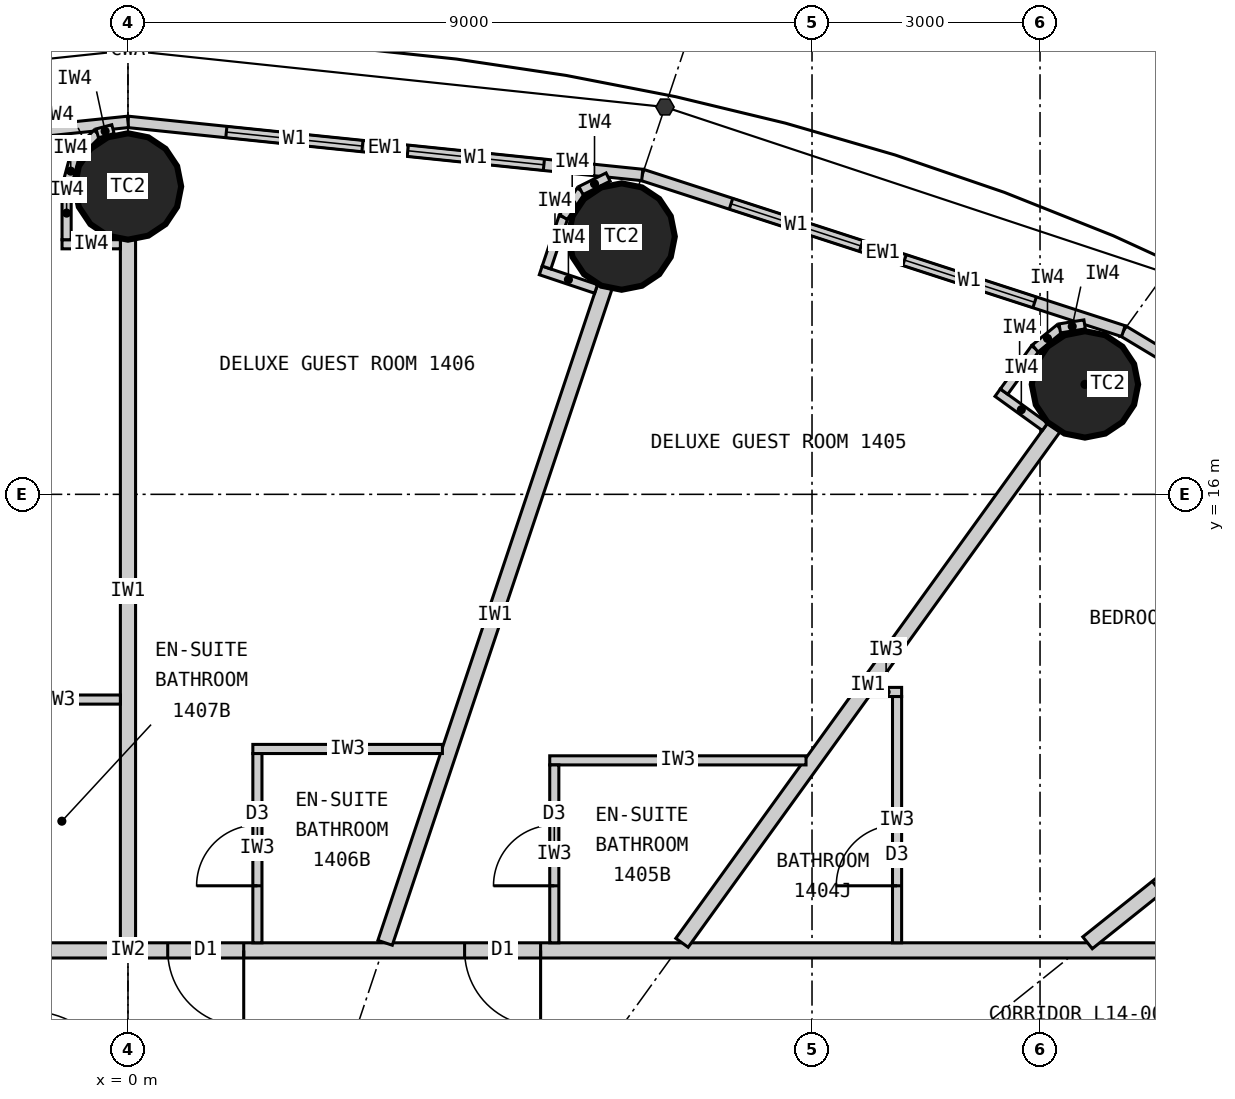
"""IFC4 building model, lengths in metres.
Left out: names, types, materials, properties, quantities, classifications, styles, units other than length and angle.
Written with IfcOpenShell. Run it as: python <this file> out.ifc"""

import sys

from ifc_helpers import new_model, si_unit, direction, frame, frame_2d, origin, origin_2d, place, context, subcontext, project, spatial, rectangle, circle, extrude, element, fill, save


model = new_model("IFC4")
c1 = context("Model", 3, precision=1e-05, world=origin(), true_north=direction((0.0, 1.0)))
c2 = subcontext(c1, "Body", "Model", "MODEL_VIEW")
j1 = project(units=[si_unit("LENGTHUNIT", "METRE"), si_unit("PLANEANGLEUNIT", "RADIAN")], contexts=[c1])
p1 = place(None, origin())
s1 = spatial("IfcSite", under=j1, at=p1, CompositionType="ELEMENT")
p2 = place(p1, origin())
s2 = spatial("IfcBuilding", under=s1, at=p2, CompositionType="ELEMENT")
p3 = place(p2, frame((0.0, 0.0, 60.6)))
s3 = spatial("IfcBuildingStorey", under=s2, at=p3, CompositionType="ELEMENT", Elevation=60.6)
for number, where, z_axis, x_axis in (
    (1, (12.591, 17.447, 0.0), (0.0, 0.0, 1.0), (1.0, 0.0, 0.0)),
    (2, (6.495, 19.391, 0.0), (0.0, 0.0, 1.0), (1.0, 0.0, 0.0)),
    (3, (0.0, 20.05, 0.0), (0.0, 0.0, 1.0), (1.0, 0.0, 0.0)),
):
    element("IfcColumn", number, at=place(p3, frame(where, z_axis=z_axis, x_axis=x_axis)), inside=s3, PredefinedType="COLUMN", context=c2, shape_type="SweptSolid", body=[
        extrude(circle(Radius=0.7, at=origin_2d()), origin(), (0.0, 0.0, 1.0), 3.3),
    ])
p4 = place(p3, frame((18.57, 14.856, 0.0), z_axis=(0.0, 0.0, 1.0), x_axis=(-0.856983180864, 0.515344377787, 0.0)))
e4 = element("IfcWall", 4, at=p4, inside=s3, PredefinedType="ELEMENTEDWALL", context=c2, shape_type="SweptSolid", body=[
    extrude(rectangle(XDim=6.386, YDim=0.15, at=frame_2d((3.193, 0.0))), origin(), (0.0, 0.0, 1.0), 3.12),
])
p5 = place(p4, frame((1.093, 0.0, 0.9)))
e5 = element("IfcOpeningElement", 5, at=p5, cuts=e4, PredefinedType="OPENING", context=c2, shape_type="SweptSolid", body=[
    extrude(rectangle(XDim=1.8, YDim=1.9, at=frame_2d((0.9, 0.95))), frame((0.0, 0.085, 0.0), z_axis=(0.0, -1.0, 0.0), x_axis=(1.0, 0.0, 0.0)), (0.0, 0.0, 1.0), 0.17),
])
p6 = place(p4, frame((3.493, 0.0, 0.9)))
e6 = element("IfcOpeningElement", 6, at=p6, cuts=e4, PredefinedType="OPENING", context=c2, shape_type="SweptSolid", body=[
    extrude(rectangle(XDim=1.8, YDim=1.9, at=frame_2d((0.9, 0.95))), frame((0.0, 0.085, 0.0), z_axis=(0.0, -1.0, 0.0), x_axis=(1.0, 0.0, 0.0)), (0.0, 0.0, 1.0), 0.17),
])
p7 = place(p3, frame((13.096, 18.147, 0.0), z_axis=(0.0, 0.0, 1.0), x_axis=(-0.951137534625, 0.308767534285, 0.0)))
e7 = element("IfcWall", 7, at=p7, inside=s3, PredefinedType="ELEMENTEDWALL", context=c2, shape_type="SweptSolid", body=[
    extrude(rectangle(XDim=6.655, YDim=0.15, at=frame_2d((3.328, 0.0))), origin(), (0.0, 0.0, 1.0), 3.12),
])
p8 = place(p7, frame((1.228, 0.0, 0.9)))
e8 = element("IfcOpeningElement", 8, at=p8, cuts=e7, PredefinedType="OPENING", context=c2, shape_type="SweptSolid", body=[
    extrude(rectangle(XDim=1.8, YDim=1.9, at=frame_2d((0.9, 0.95))), frame((0.0, 0.085, 0.0), z_axis=(0.0, -1.0, 0.0), x_axis=(1.0, 0.0, 0.0)), (0.0, 0.0, 1.0), 0.17),
])
p9 = place(p7, frame((3.628, 0.0, 0.9)))
e9 = element("IfcOpeningElement", 9, at=p9, cuts=e7, PredefinedType="OPENING", context=c2, shape_type="SweptSolid", body=[
    extrude(rectangle(XDim=1.8, YDim=1.9, at=frame_2d((0.9, 0.95))), frame((0.0, 0.085, 0.0), z_axis=(0.0, -1.0, 0.0), x_axis=(1.0, 0.0, 0.0)), (0.0, 0.0, 1.0), 0.17),
])
p10 = place(p3, frame((6.766, 20.202, 0.0), z_axis=(0.0, 0.0, 1.0), x_axis=(-0.994721394369, 0.102612609291, 0.0)))
e10 = element("IfcWall", 10, at=p10, inside=s3, PredefinedType="ELEMENTEDWALL", context=c2, shape_type="SweptSolid", body=[
    extrude(rectangle(XDim=6.802, YDim=0.15, at=frame_2d((3.401, 0.0))), origin(), (0.0, 0.0, 1.0), 3.12),
])
p11 = place(p10, frame((1.301, 0.0, 0.9)))
e11 = element("IfcOpeningElement", 11, at=p11, cuts=e10, PredefinedType="OPENING", context=c2, shape_type="SweptSolid", body=[
    extrude(rectangle(XDim=1.8, YDim=1.9, at=frame_2d((0.9, 0.95))), frame((0.0, 0.085, 0.0), z_axis=(0.0, -1.0, 0.0), x_axis=(1.0, 0.0, 0.0)), (0.0, 0.0, 1.0), 0.17),
])
p12 = place(p10, frame((3.701, 0.0, 0.9)))
e12 = element("IfcOpeningElement", 12, at=p12, cuts=e10, PredefinedType="OPENING", context=c2, shape_type="SweptSolid", body=[
    extrude(rectangle(XDim=1.8, YDim=1.9, at=frame_2d((0.9, 0.95))), frame((0.0, 0.085, 0.0), z_axis=(0.0, -1.0, 0.0), x_axis=(1.0, 0.0, 0.0)), (0.0, 0.0, 1.0), 0.17),
])
p13 = place(p3, frame((0.0, 20.9, 0.0), z_axis=(0.0, 0.0, 1.0), x_axis=(-0.994721394369, -0.102612609291, 0.0)))
e13 = element("IfcWall", 13, at=p13, inside=s3, PredefinedType="ELEMENTEDWALL", context=c2, shape_type="SweptSolid", body=[
    extrude(rectangle(XDim=6.802, YDim=0.15, at=frame_2d((3.401, 0.0))), origin(), (0.0, 0.0, 1.0), 3.12),
])
p14 = place(p13, frame((1.301, 0.0, 0.9)))
e14 = element("IfcOpeningElement", 14, at=p14, cuts=e13, PredefinedType="OPENING", context=c2, shape_type="SweptSolid", body=[
    extrude(rectangle(XDim=1.8, YDim=1.9, at=frame_2d((0.9, 0.95))), frame((0.0, 0.085, 0.0), z_axis=(0.0, -1.0, 0.0), x_axis=(1.0, 0.0, 0.0)), (0.0, 0.0, 1.0), 0.17),
])
p15 = place(p13, frame((3.701, 0.0, 0.9)))
e15 = element("IfcOpeningElement", 15, at=p15, cuts=e13, PredefinedType="OPENING", context=c2, shape_type="SweptSolid", body=[
    extrude(rectangle(XDim=1.8, YDim=1.9, at=frame_2d((0.9, 0.95))), frame((0.0, 0.085, 0.0), z_axis=(0.0, -1.0, 0.0), x_axis=(1.0, 0.0, 0.0)), (0.0, 0.0, 1.0), 0.17),
])
p16 = place(p3, frame((-14.1, 10.0, 0.0), z_axis=(0.0, 0.0, 1.0), x_axis=(1.0, 0.0, 0.0)))
e16 = element("IfcWall", 16, at=p16, inside=s3, PredefinedType="PARTITIONING", context=c2, shape_type="SweptSolid", body=[
    extrude(rectangle(XDim=28.2, YDim=0.2, at=frame_2d((14.1, 0.0))), origin(), (0.0, 0.0, 1.0), 3.12),
])
p17 = place(p16, frame((18.529, 0.0, 0.0)))
e17 = element("IfcOpeningElement", 17, at=p17, cuts=e16, PredefinedType="OPENING", context=c2, shape_type="SweptSolid", body=[
    extrude(rectangle(XDim=1.0, YDim=2.2, at=frame_2d((0.5, 1.1))), frame((0.0, 0.11, 0.0), z_axis=(0.0, -1.0, 0.0), x_axis=(1.0, 0.0, 0.0)), (0.0, 0.0, 1.0), 0.22),
])
p18 = place(p16, frame((14.623, 0.0, 0.0)))
e18 = element("IfcOpeningElement", 18, at=p18, cuts=e16, PredefinedType="OPENING", context=c2, shape_type="SweptSolid", body=[
    extrude(rectangle(XDim=1.0, YDim=2.2, at=frame_2d((0.5, 1.1))), frame((0.0, 0.11, 0.0), z_axis=(0.0, -1.0, 0.0), x_axis=(1.0, 0.0, 0.0)), (0.0, 0.0, 1.0), 0.22),
])
p19 = place(p16, frame((11.24, 0.0, 0.0)))
e19 = element("IfcOpeningElement", 19, at=p19, cuts=e16, PredefinedType="OPENING", context=c2, shape_type="SweptSolid", body=[
    extrude(rectangle(XDim=1.0, YDim=2.2, at=frame_2d((0.5, 1.1))), frame((0.0, 0.11, 0.0), z_axis=(0.0, -1.0, 0.0), x_axis=(1.0, 0.0, 0.0)), (0.0, 0.0, 1.0), 0.22),
])
p20 = place(p16, frame((8.671, 0.0, 0.0)))
e20 = element("IfcOpeningElement", 20, at=p20, cuts=e16, PredefinedType="OPENING", context=c2, shape_type="SweptSolid", body=[
    extrude(rectangle(XDim=1.0, YDim=2.2, at=frame_2d((0.5, 1.1))), frame((0.0, 0.11, 0.0), z_axis=(0.0, -1.0, 0.0), x_axis=(1.0, 0.0, 0.0)), (0.0, 0.0, 1.0), 0.22),
])
p21 = place(p16, frame((2.801, 0.0, 0.0)))
e21 = element("IfcOpeningElement", 21, at=p21, cuts=e16, PredefinedType="OPENING", context=c2, shape_type="SweptSolid", body=[
    extrude(rectangle(XDim=1.0, YDim=2.2, at=frame_2d((0.5, 1.1))), frame((0.0, 0.11, 0.0), z_axis=(0.0, -1.0, 0.0), x_axis=(1.0, 0.0, 0.0)), (0.0, 0.0, 1.0), 0.22),
])
p22 = place(p3, frame((12.625, 10.1, 0.0), z_axis=(0.0, 0.0, 1.0), x_axis=(0.780892451574, 0.624665493744, 0.0)))
e22 = element("IfcWall", 22, at=p22, inside=s3, PredefinedType="PARTITIONING", context=c2, shape_type="SweptSolid", body=[
    extrude(rectangle(XDim=6.045, YDim=0.2, at=frame_2d((3.022, 0.0))), origin(), (0.0, 0.0, 1.0), 2.32),
])
p23 = place(p22, frame((1.17, 0.0, 0.0)))
e23 = element("IfcOpeningElement", 23, at=p23, cuts=e22, PredefinedType="OPENING", context=c2, shape_type="SweptSolid", body=[
    extrude(rectangle(XDim=0.9, YDim=2.1, at=frame_2d((0.45, 1.05))), frame((0.0, 0.11, 0.0), z_axis=(0.0, -1.0, 0.0), x_axis=(1.0, 0.0, 0.0)), (0.0, 0.0, 1.0), 0.22),
])
p24 = place(p3, frame((7.289, 10.1, 0.0), z_axis=(0.0, 0.0, 1.0), x_axis=(0.585198353053, 0.810890182197, 0.0)))
e24 = element("IfcWall", 24, at=p24, inside=s3, PredefinedType="PARTITIONING", context=c2, shape_type="SweptSolid", body=[
    extrude(rectangle(XDim=8.36, YDim=0.2, at=frame_2d((4.18, 0.0))), origin(), (0.0, 0.0, 1.0), 2.32),
])
p25 = place(p3, frame((3.383, 10.1, 0.0), z_axis=(0.0, 0.0, 1.0), x_axis=(0.31759592231, 0.948226149256, 0.0)))
e25 = element("IfcWall", 25, at=p25, inside=s3, PredefinedType="PARTITIONING", context=c2, shape_type="SweptSolid", body=[
    extrude(rectangle(XDim=9.098, YDim=0.2, at=frame_2d((4.549, 0.0))), origin(), (0.0, 0.0, 1.0), 2.32),
])
p26 = place(p3, frame((0.0, 10.1, 0.0), z_axis=(0.0, 0.0, 1.0), x_axis=(0.0, 1.0, 0.0)))
e26 = element("IfcWall", 26, at=p26, inside=s3, PredefinedType="PARTITIONING", context=c2, shape_type="SweptSolid", body=[
    extrude(rectangle(XDim=9.25, YDim=0.2, at=frame_2d((4.625, 0.0))), origin(), (0.0, 0.0, 1.0), 2.32),
])
p27 = place(p3, frame((9.771, 13.4, 0.0), z_axis=(0.0, 0.0, 1.0), x_axis=(1.0, 0.0, 0.0)))
e27 = element("IfcWall", 27, at=p27, inside=s3, PredefinedType="PARTITIONING", context=c2, shape_type="SweptSolid", body=[
    extrude(rectangle(XDim=0.408, YDim=0.12, at=frame_2d((0.204, 0.0))), origin(), (0.0, 0.0, 1.0), 3.12),
])
p28 = place(p3, frame((10.119, 10.1, 0.0), z_axis=(0.0, 0.0, 1.0), x_axis=(0.0, 1.0, 0.0)))
e28 = element("IfcWall", 28, at=p28, inside=s3, PredefinedType="PARTITIONING", context=c2, shape_type="SweptSolid", body=[
    extrude(rectangle(XDim=3.24, YDim=0.12, at=frame_2d((1.62, 0.0))), origin(), (0.0, 0.0, 1.0), 3.12),
])
p29 = place(p28, frame((0.75, 0.0, 0.0)))
e29 = element("IfcOpeningElement", 29, at=p29, cuts=e28, PredefinedType="OPENING", context=c2, shape_type="SweptSolid", body=[
    extrude(rectangle(XDim=0.8, YDim=2.1, at=frame_2d((0.4, 1.05))), frame((0.0, 0.07, 0.0), z_axis=(0.0, -1.0, 0.0), x_axis=(1.0, 0.0, 0.0)), (0.0, 0.0, 1.0), 0.14),
])
p30 = place(p3, frame((8.921, 12.5, 0.0), z_axis=(0.0, 0.0, 1.0), x_axis=(-1.0, 0.0, 0.0)))
e30 = element("IfcWall", 30, at=p30, inside=s3, PredefinedType="PARTITIONING", context=c2, shape_type="SweptSolid", body=[
    extrude(rectangle(XDim=3.372, YDim=0.12, at=frame_2d((1.686, 0.0))), origin(), (0.0, 0.0, 1.0), 3.12),
])
p31 = place(p3, frame((5.609, 10.1, 0.0), z_axis=(0.0, 0.0, 1.0), x_axis=(0.0, 1.0, 0.0)))
e31 = element("IfcWall", 31, at=p31, inside=s3, PredefinedType="PARTITIONING", context=c2, shape_type="SweptSolid", body=[
    extrude(rectangle(XDim=2.34, YDim=0.12, at=frame_2d((1.17, 0.0))), origin(), (0.0, 0.0, 1.0), 3.12),
])
p32 = place(p31, frame((0.75, 0.0, 0.0)))
e32 = element("IfcOpeningElement", 32, at=p32, cuts=e31, PredefinedType="OPENING", context=c2, shape_type="SweptSolid", body=[
    extrude(rectangle(XDim=0.8, YDim=2.1, at=frame_2d((0.4, 1.05))), frame((0.0, 0.07, 0.0), z_axis=(0.0, -1.0, 0.0), x_axis=(1.0, 0.0, 0.0)), (0.0, 0.0, 1.0), 0.14),
])
p33 = place(p3, frame((4.137, 12.65, 0.0), z_axis=(0.0, 0.0, 1.0), x_axis=(-1.0, 0.0, 0.0)))
e33 = element("IfcWall", 33, at=p33, inside=s3, PredefinedType="PARTITIONING", context=c2, shape_type="SweptSolid", body=[
    extrude(rectangle(XDim=2.494, YDim=0.12, at=frame_2d((1.247, 0.0))), origin(), (0.0, 0.0, 1.0), 3.12),
])
p34 = place(p3, frame((1.703, 10.1, 0.0), z_axis=(0.0, 0.0, 1.0), x_axis=(0.0, 1.0, 0.0)))
e34 = element("IfcWall", 34, at=p34, inside=s3, PredefinedType="PARTITIONING", context=c2, shape_type="SweptSolid", body=[
    extrude(rectangle(XDim=2.49, YDim=0.12, at=frame_2d((1.245, 0.0))), origin(), (0.0, 0.0, 1.0), 3.12),
])
p35 = place(p34, frame((0.75, 0.0, 0.0)))
e35 = element("IfcOpeningElement", 35, at=p35, cuts=e34, PredefinedType="OPENING", context=c2, shape_type="SweptSolid", body=[
    extrude(rectangle(XDim=0.8, YDim=2.1, at=frame_2d((0.4, 1.05))), frame((0.0, 0.07, 0.0), z_axis=(0.0, -1.0, 0.0), x_axis=(1.0, 0.0, 0.0)), (0.0, 0.0, 1.0), 0.14),
])
p36 = place(p3, frame((-0.1, 13.3, 0.0), z_axis=(0.0, 0.0, 1.0), x_axis=(-1.0, 0.0, 0.0)))
e36 = element("IfcWall", 36, at=p36, inside=s3, PredefinedType="PARTITIONING", context=c2, shape_type="SweptSolid", body=[
    extrude(rectangle(XDim=1.64, YDim=0.12, at=frame_2d((0.82, 0.0))), origin(), (0.0, 0.0, 1.0), 3.12),
])
p37 = place(p3, frame((12.065, 16.889, 0.0), z_axis=(0.0, 0.0, 1.0), x_axis=(-0.810821798253, 0.585293098778, 0.0)))
e37 = element("IfcWall", 37, at=p37, inside=s3, PredefinedType="PARTITIONING", context=c2, shape_type="SweptSolid", body=[
    extrude(rectangle(XDim=0.768, YDim=0.12, at=frame_2d((0.384, 0.0))), origin(), (0.0, 0.0, 1.0), 3.12),
])
p38 = place(p3, frame((11.526, 17.351, 0.0), z_axis=(0.0, 0.0, 1.0), x_axis=(0.585223113993, 0.810872312296, 0.0)))
e38 = element("IfcWall", 38, at=p38, inside=s3, PredefinedType="PARTITIONING", context=c2, shape_type="SweptSolid", body=[
    extrude(rectangle(XDim=0.7, YDim=0.12, at=frame_2d((0.35, 0.0))), origin(), (0.0, 0.0, 1.0), 3.12),
])
p39 = place(p3, frame((11.936, 17.919, 0.0), z_axis=(0.0, 0.0, 1.0), x_axis=(0.775023088441, 0.631932917629, 0.0)))
e39 = element("IfcWall", 39, at=p39, inside=s3, PredefinedType="PARTITIONING", context=c2, shape_type="SweptSolid", body=[
    extrude(rectangle(XDim=0.418, YDim=0.12, at=frame_2d((0.209, 0.0))), origin(), (0.0, 0.0, 1.0), 3.12),
])
p40 = place(p3, frame((12.26, 18.183, 0.0), z_axis=(0.0, 0.0, 1.0), x_axis=(0.987218661664, 0.159371622511, 0.0)))
e40 = element("IfcWall", 40, at=p40, inside=s3, PredefinedType="PARTITIONING", context=c2, shape_type="SweptSolid", body=[
    extrude(rectangle(XDim=0.331, YDim=0.12, at=frame_2d((0.166, 0.0))), origin(), (0.0, 0.0, 1.0), 3.12),
])
p41 = place(p3, frame((6.159, 18.702, 0.0), z_axis=(0.0, 0.0, 1.0), x_axis=(-0.948173154049, 0.31775410295, 0.0)))
e41 = element("IfcWall", 41, at=p41, inside=s3, PredefinedType="PARTITIONING", context=c2, shape_type="SweptSolid", body=[
    extrude(rectangle(XDim=0.768, YDim=0.12, at=frame_2d((0.384, 0.0))), origin(), (0.0, 0.0, 1.0), 3.12),
])
p42 = place(p3, frame((5.507, 18.984, 0.0), z_axis=(0.0, 0.0, 1.0), x_axis=(0.317692050622, 0.948193946918, 0.0)))
e42 = element("IfcWall", 42, at=p42, inside=s3, PredefinedType="PARTITIONING", context=c2, shape_type="SweptSolid", body=[
    extrude(rectangle(XDim=0.7, YDim=0.12, at=frame_2d((0.35, 0.0))), origin(), (0.0, 0.0, 1.0), 3.12),
])
p43 = place(p3, frame((5.729, 19.648, 0.0), z_axis=(0.0, 0.0, 1.0), x_axis=(0.552135764955, 0.833754218615, 0.0)))
e43 = element("IfcWall", 43, at=p43, inside=s3, PredefinedType="PARTITIONING", context=c2, shape_type="SweptSolid", body=[
    extrude(rectangle(XDim=0.418, YDim=0.12, at=frame_2d((0.209, 0.0))), origin(), (0.0, 0.0, 1.0), 3.12),
])
p44 = place(p3, frame((5.96, 19.996, 0.0), z_axis=(0.0, 0.0, 1.0), x_axis=(0.895160725913, 0.445743507842, 0.0)))
e44 = element("IfcWall", 44, at=p44, inside=s3, PredefinedType="PARTITIONING", context=c2, shape_type="SweptSolid", body=[
    extrude(rectangle(XDim=0.399, YDim=0.12, at=frame_2d((0.199, 0.0))), origin(), (0.0, 0.0, 1.0), 3.12),
])
p45 = place(p3, frame((-0.1, 19.29, 0.0), z_axis=(0.0, 0.0, 1.0), x_axis=(-1.0, 0.0, 0.0)))
e45 = element("IfcWall", 45, at=p45, inside=s3, PredefinedType="PARTITIONING", context=c2, shape_type="SweptSolid", body=[
    extrude(rectangle(XDim=0.767, YDim=0.12, at=frame_2d((0.384, 0.0))), origin(), (0.0, 0.0, 1.0), 3.12),
])
p46 = place(p3, frame((-0.808, 19.35, 0.0), z_axis=(0.0, 0.0, 1.0), x_axis=(0.0, 1.0, 0.0)))
e46 = element("IfcWall", 46, at=p46, inside=s3, PredefinedType="PARTITIONING", context=c2, shape_type="SweptSolid", body=[
    extrude(rectangle(XDim=0.7, YDim=0.12, at=frame_2d((0.35, 0.0))), origin(), (0.0, 0.0, 1.0), 3.12),
])
p47 = place(p3, frame((-0.808, 20.05, 0.0), z_axis=(0.0, 0.0, 1.0), x_axis=(0.2592614205, 0.965807183573, 0.0)))
e47 = element("IfcWall", 47, at=p47, inside=s3, PredefinedType="PARTITIONING", context=c2, shape_type="SweptSolid", body=[
    extrude(rectangle(XDim=0.418, YDim=0.12, at=frame_2d((0.209, 0.0))), origin(), (0.0, 0.0, 1.0), 3.12),
])
p48 = place(p3, frame((-0.699, 20.454, 0.0), z_axis=(0.0, 0.0, 1.0), x_axis=(0.707106781187, 0.707106781187, 0.0)))
e48 = element("IfcWall", 48, at=p48, inside=s3, PredefinedType="PARTITIONING", context=c2, shape_type="SweptSolid", body=[
    extrude(rectangle(XDim=0.418, YDim=0.12, at=frame_2d((0.209, 0.0))), origin(), (0.0, 0.0, 1.0), 3.12),
])
p49 = place(p3, frame((-0.404, 20.749, 0.0), z_axis=(0.0, 0.0, 1.0), x_axis=(0.965759066438, 0.25944060128, 0.0)))
e49 = element("IfcWall", 49, at=p49, inside=s3, PredefinedType="PARTITIONING", context=c2, shape_type="SweptSolid", body=[
    extrude(rectangle(XDim=0.214, YDim=0.12, at=frame_2d((0.107, 0.0))), origin(), (0.0, 0.0, 1.0), 3.12),
])
p50 = place(p8, origin())
e50 = element("IfcWindow", 50, at=p50, inside=s3, PartitioningType="SINGLE_PANEL", PredefinedType="WINDOW", context=c2, shape_type="SweptSolid", body=[
    extrude(rectangle(XDim=1.8, YDim=1.9, at=frame_2d((0.9, 0.95))), frame((0.0, 0.03, 0.0), z_axis=(0.0, -1.0, 0.0), x_axis=(1.0, 0.0, 0.0)), (0.0, 0.0, 1.0), 0.06),
])
fill(e8, e50)
p51 = place(p9, origin())
e51 = element("IfcWindow", 51, at=p51, inside=s3, PartitioningType="SINGLE_PANEL", PredefinedType="WINDOW", context=c2, shape_type="SweptSolid", body=[
    extrude(rectangle(XDim=1.8, YDim=1.9, at=frame_2d((0.9, 0.95))), frame((0.0, 0.03, 0.0), z_axis=(0.0, -1.0, 0.0), x_axis=(1.0, 0.0, 0.0)), (0.0, 0.0, 1.0), 0.06),
])
fill(e9, e51)
p52 = place(p11, origin())
e52 = element("IfcWindow", 52, at=p52, inside=s3, PartitioningType="SINGLE_PANEL", PredefinedType="WINDOW", context=c2, shape_type="SweptSolid", body=[
    extrude(rectangle(XDim=1.8, YDim=1.9, at=frame_2d((0.9, 0.95))), frame((0.0, 0.03, 0.0), z_axis=(0.0, -1.0, 0.0), x_axis=(1.0, 0.0, 0.0)), (0.0, 0.0, 1.0), 0.06),
])
fill(e11, e52)
p53 = place(p12, origin())
e53 = element("IfcWindow", 53, at=p53, inside=s3, PartitioningType="SINGLE_PANEL", PredefinedType="WINDOW", context=c2, shape_type="SweptSolid", body=[
    extrude(rectangle(XDim=1.8, YDim=1.9, at=frame_2d((0.9, 0.95))), frame((0.0, 0.03, 0.0), z_axis=(0.0, -1.0, 0.0), x_axis=(1.0, 0.0, 0.0)), (0.0, 0.0, 1.0), 0.06),
])
fill(e12, e53)
p54 = place(p29, origin())
e54 = element("IfcDoor", 54, at=p54, inside=s3, OperationType="SINGLE_SWING_LEFT", PredefinedType="DOOR", context=c2, shape_type="SweptSolid", body=[
    extrude(rectangle(XDim=0.8, YDim=2.1, at=frame_2d((0.4, 1.05))), frame((0.0, 0.025, 0.0), z_axis=(0.0, -1.0, 0.0), x_axis=(1.0, 0.0, 0.0)), (0.0, 0.0, 1.0), 0.05),
])
fill(e29, e54)
p55 = place(p32, origin())
e55 = element("IfcDoor", 55, at=p55, inside=s3, OperationType="SINGLE_SWING_LEFT", PredefinedType="DOOR", context=c2, shape_type="SweptSolid", body=[
    extrude(rectangle(XDim=0.8, YDim=2.1, at=frame_2d((0.4, 1.05))), frame((0.0, 0.025, 0.0), z_axis=(0.0, -1.0, 0.0), x_axis=(1.0, 0.0, 0.0)), (0.0, 0.0, 1.0), 0.05),
])
fill(e32, e55)
p56 = place(p17, origin())
e56 = element("IfcDoor", 56, at=p56, inside=s3, OperationType="SINGLE_SWING_RIGHT", PredefinedType="DOOR", context=c2, shape_type="SweptSolid", body=[
    extrude(rectangle(XDim=1.0, YDim=2.2, at=frame_2d((0.5, 1.1))), frame((0.0, 0.025, 0.0), z_axis=(0.0, -1.0, 0.0), x_axis=(1.0, 0.0, 0.0)), (0.0, 0.0, 1.0), 0.05),
])
fill(e17, e56)
p57 = place(p35, origin())
e57 = element("IfcDoor", 57, at=p57, inside=s3, OperationType="SINGLE_SWING_LEFT", PredefinedType="DOOR", context=c2, shape_type="SweptSolid", body=[
    extrude(rectangle(XDim=0.8, YDim=2.1, at=frame_2d((0.4, 1.05))), frame((0.0, 0.025, 0.0), z_axis=(0.0, -1.0, 0.0), x_axis=(1.0, 0.0, 0.0)), (0.0, 0.0, 1.0), 0.05),
])
fill(e35, e57)
p58 = place(p18, origin())
e58 = element("IfcDoor", 58, at=p58, inside=s3, OperationType="SINGLE_SWING_RIGHT", PredefinedType="DOOR", context=c2, shape_type="SweptSolid", body=[
    extrude(rectangle(XDim=1.0, YDim=2.2, at=frame_2d((0.5, 1.1))), frame((0.0, 0.025, 0.0), z_axis=(0.0, -1.0, 0.0), x_axis=(1.0, 0.0, 0.0)), (0.0, 0.0, 1.0), 0.05),
])
fill(e18, e58)
save(model, sys.argv[1])
